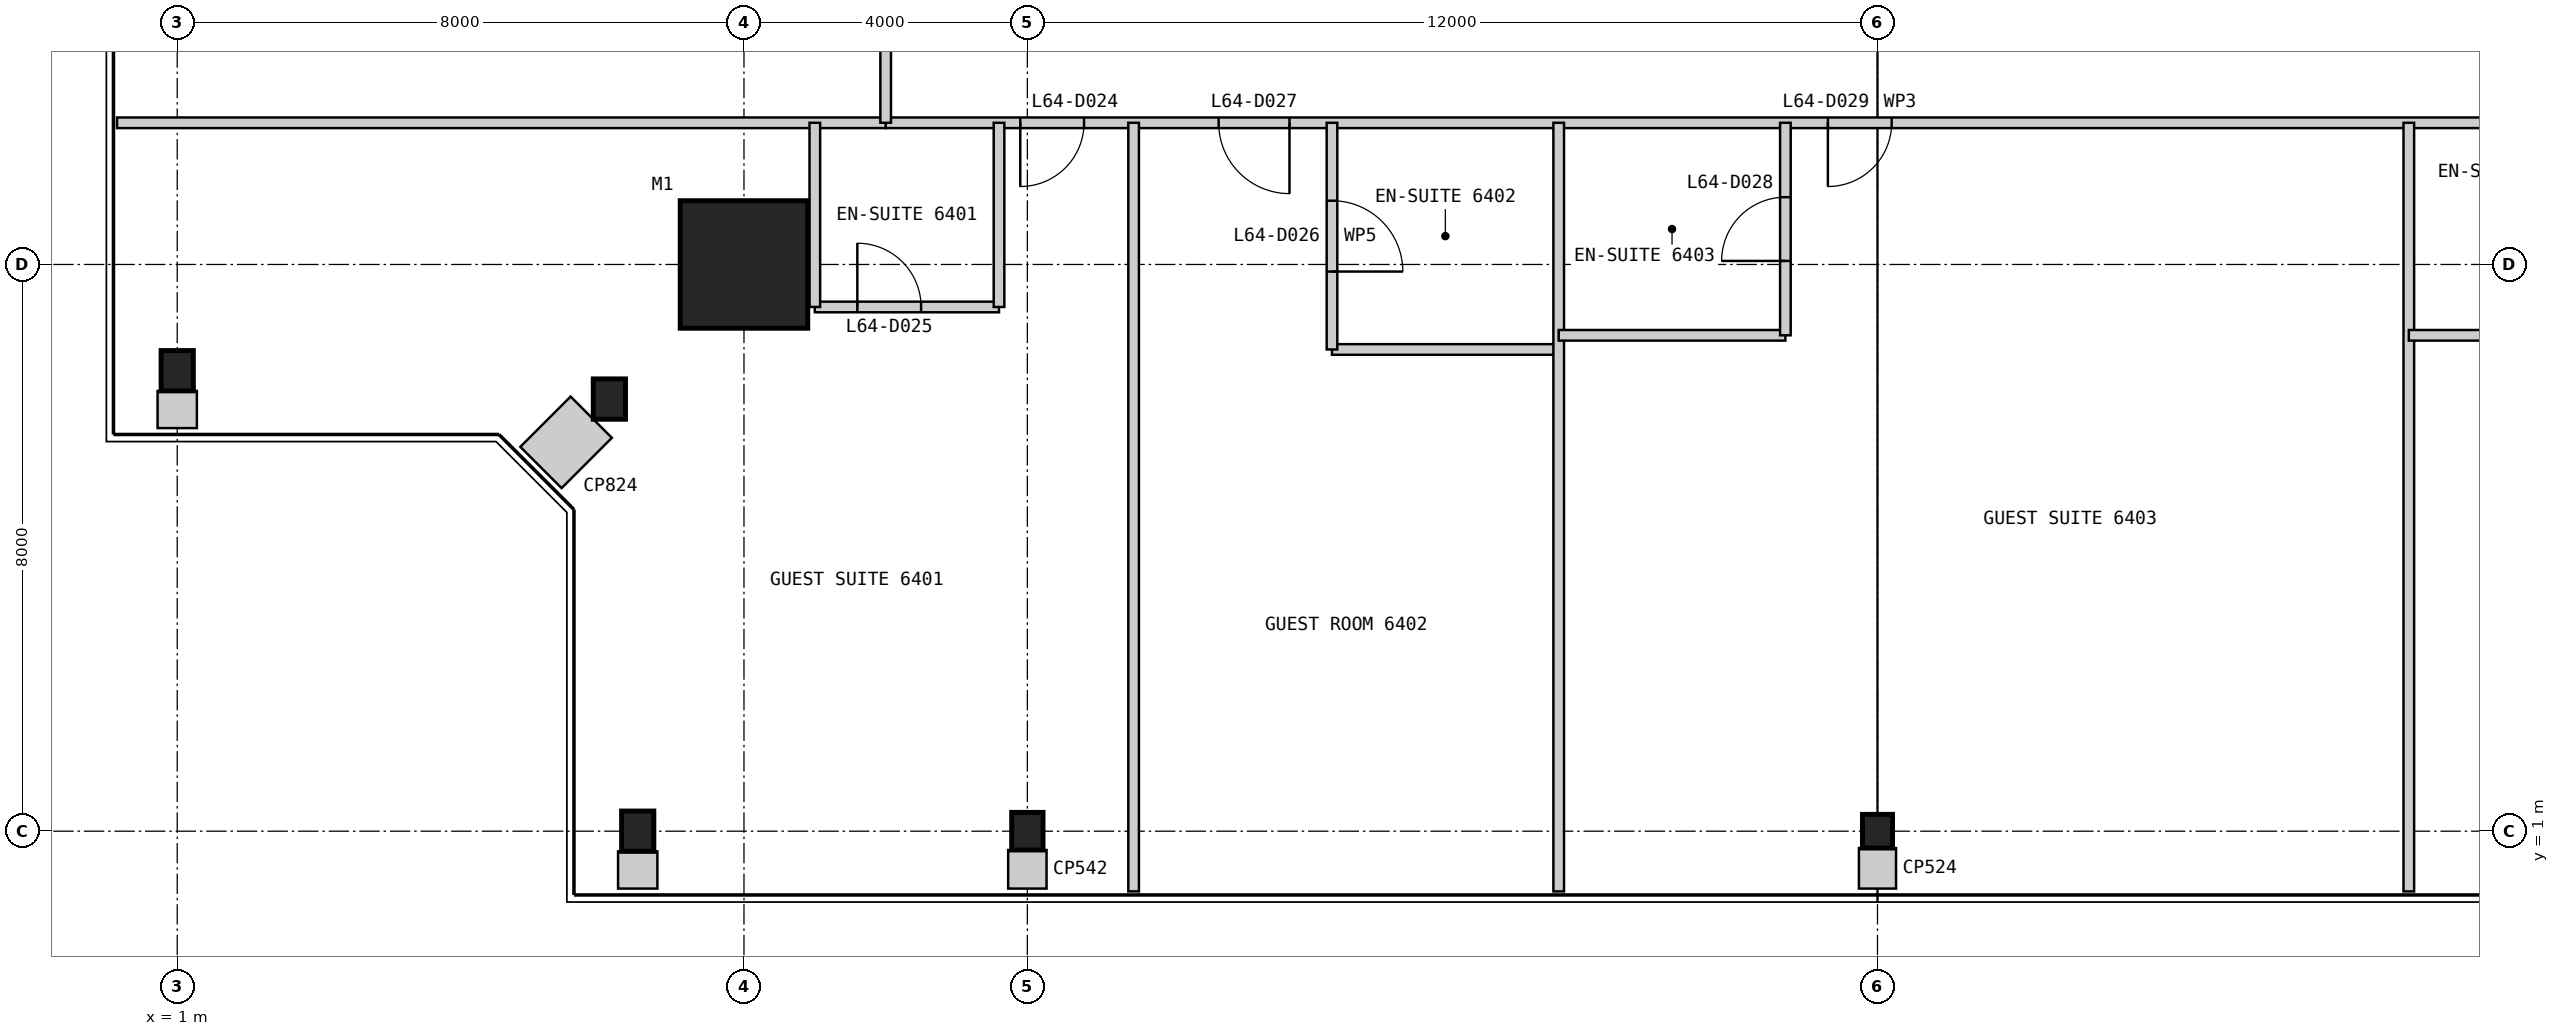
"""IFC4 building model, lengths in metres.
Left out: names, types, materials, properties, quantities, classifications, styles, units other than length and angle.
Written with IfcOpenShell. Run it as: python <this file> out.ifc"""

import sys

from ifc_helpers import new_model, si_unit, direction, frame, frame_2d, origin, origin_2d, place, context, subcontext, project, spatial, rectangle, i_section, extrude, element, fill, save


model = new_model("IFC4")
c1 = context("Model", 3, precision=1e-05, world=origin(), true_north=direction((0.0, 1.0)))
c2 = subcontext(c1, "Body", "Model", "MODEL_VIEW")
j1 = project(units=[si_unit("LENGTHUNIT", "METRE"), si_unit("PLANEANGLEUNIT", "RADIAN")], contexts=[c1])
p1 = place(None, origin())
s1 = spatial("IfcSite", under=j1, at=p1, CompositionType="ELEMENT")
p2 = place(p1, origin())
s2 = spatial("IfcBuilding", under=s1, at=p2, CompositionType="ELEMENT")
p3 = place(p2, frame((0.0, 0.0, 269.6)))
s3 = spatial("IfcBuildingStorey", under=s2, at=p3, CompositionType="ELEMENT", Elevation=269.6)
p4 = place(p3, frame((9.0, 9.0, 0.0), z_axis=(0.0, 0.0, 1.0), x_axis=(1.0, 0.0, 0.0)))
e1 = element("IfcColumn", 1, at=p4, inside=s3, PredefinedType="COLUMN", context=c2, shape_type="SweptSolid", body=[
    extrude(rectangle(XDim=1.8, YDim=1.8, at=origin_2d()), origin(), (0.0, 0.0, 1.0), 3.4),
])
p5 = place(p3, frame((7.5, 1.0, 0.0), z_axis=(0.0, 0.0, 1.0), x_axis=(1.0, 0.0, 0.0)))
e2 = element("IfcColumn", 2, at=p5, inside=s3, PredefinedType="COLUMN", context=c2, shape_type="SweptSolid", body=[
    extrude(i_section(OverallWidth=0.455, OverallDepth=0.569, WebThickness=0.078, FlangeThickness=0.125, at=origin_2d()), origin(), (0.0, 0.0, 1.0), 3.4),
])
p6 = place(p3, frame((13.0, 1.0, 0.0), z_axis=(0.0, 0.0, 1.0), x_axis=(1.0, 0.0, 0.0)))
e3 = element("IfcColumn", 3, at=p6, inside=s3, PredefinedType="COLUMN", context=c2, shape_type="SweptSolid", body=[
    extrude(i_section(OverallWidth=0.442, OverallDepth=0.531, WebThickness=0.066, FlangeThickness=0.106, at=origin_2d()), origin(), (0.0, 0.0, 1.0), 3.4),
])
p7 = place(p3, frame((25.0, 1.0, 0.0), z_axis=(0.0, 0.0, 1.0), x_axis=(1.0, 0.0, 0.0)))
e4 = element("IfcColumn", 4, at=p7, inside=s3, PredefinedType="COLUMN", context=c2, shape_type="SweptSolid", body=[
    extrude(i_section(OverallWidth=0.424, OverallDepth=0.475, WebThickness=0.048, FlangeThickness=0.077, at=origin_2d()), origin(), (0.0, 0.0, 1.0), 3.4),
])
for number, where, z_axis, x_axis in (
    (5, (1.0, 7.5, 0.0), (0.0, 0.0, 1.0), (1.0, 0.0, 0.0)),
    (6, (7.1, 7.1, 0.0), (0.0, 0.0, 1.0), (1.0, 0.0, 0.0)),
):
    element("IfcColumn", number, at=place(p3, frame(where, z_axis=z_axis, x_axis=x_axis)), inside=s3, PredefinedType="COLUMN", context=c2, shape_type="SweptSolid", body=[
        extrude(i_section(OverallWidth=0.455, OverallDepth=0.569, WebThickness=0.078, FlangeThickness=0.125, at=origin_2d()), origin(), (0.0, 0.0, 1.0), 3.4),
    ])
p8 = place(p3, frame((11.0, 11.0, 0.0), z_axis=(0.0, 0.0, 1.0), x_axis=(1.0, 0.0, 0.0)))
e7 = element("IfcWall", 7, at=p8, inside=s3, PredefinedType="PARTITIONING", context=c2, shape_type="SweptSolid", body=[
    extrude(rectangle(XDim=28.0, YDim=0.15, at=frame_2d((14.0, 0.0))), origin(), (0.0, 0.0, 1.0), 2.844),
])
p9 = place(p8, frame((1.9, 0.0, 0.0)))
e8 = element("IfcOpeningElement", 8, at=p9, cuts=e7, PredefinedType="OPENING", context=c2, shape_type="SweptSolid", body=[
    extrude(rectangle(XDim=0.9, YDim=2.1, at=frame_2d((0.45, 1.05))), frame((0.0, 0.085, 0.0), z_axis=(0.0, -1.0, 0.0), x_axis=(1.0, 0.0, 0.0)), (0.0, 0.0, 1.0), 0.17),
])
p10 = place(p8, frame((4.7, 0.0, 0.0)))
e9 = element("IfcOpeningElement", 9, at=p10, cuts=e7, PredefinedType="OPENING", context=c2, shape_type="SweptSolid", body=[
    extrude(rectangle(XDim=1.0, YDim=2.1, at=frame_2d((0.5, 1.05))), frame((0.0, 0.085, 0.0), z_axis=(0.0, -1.0, 0.0), x_axis=(1.0, 0.0, 0.0)), (0.0, 0.0, 1.0), 0.17),
])
p11 = place(p8, frame((13.3, 0.0, 0.0)))
e10 = element("IfcOpeningElement", 10, at=p11, cuts=e7, PredefinedType="OPENING", context=c2, shape_type="SweptSolid", body=[
    extrude(rectangle(XDim=0.9, YDim=2.1, at=frame_2d((0.45, 1.05))), frame((0.0, 0.085, 0.0), z_axis=(0.0, -1.0, 0.0), x_axis=(1.0, 0.0, 0.0)), (0.0, 0.0, 1.0), 0.17),
])
p12 = place(p8, frame((24.9, 0.0, 0.0)))
e11 = element("IfcOpeningElement", 11, at=p12, cuts=e7, PredefinedType="OPENING", context=c2, shape_type="SweptSolid", body=[
    extrude(rectangle(XDim=0.9, YDim=2.1, at=frame_2d((0.45, 1.05))), frame((0.0, 0.085, 0.0), z_axis=(0.0, -1.0, 0.0), x_axis=(1.0, 0.0, 0.0)), (0.0, 0.0, 1.0), 0.17),
])
p13 = place(p3, frame((0.15, 11.0, 0.0), z_axis=(0.0, 0.0, 1.0), x_axis=(1.0, 0.0, 0.0)))
e12 = element("IfcWall", 12, at=p13, inside=s3, PredefinedType="PARTITIONING", context=c2, shape_type="SweptSolid", body=[
    extrude(rectangle(XDim=10.85, YDim=0.15, at=frame_2d((5.425, 0.0))), origin(), (0.0, 0.0, 1.0), 2.844),
])
p14 = place(p3, frame((10.0, 8.4, 0.0), z_axis=(0.0, 0.0, 1.0), x_axis=(1.0, 0.0, 0.0)))
e13 = element("IfcWall", 13, at=p14, inside=s3, PredefinedType="PARTITIONING", context=c2, shape_type="SweptSolid", body=[
    extrude(rectangle(XDim=2.6, YDim=0.15, at=frame_2d((1.3, 0.0))), origin(), (0.0, 0.0, 1.0), 3.25),
])
p15 = place(p14, frame((0.6, 0.0, 0.0)))
e14 = element("IfcOpeningElement", 14, at=p15, cuts=e13, PredefinedType="OPENING", context=c2, shape_type="SweptSolid", body=[
    extrude(rectangle(XDim=0.9, YDim=2.1, at=frame_2d((0.45, 1.05))), frame((0.0, 0.085, 0.0), z_axis=(0.0, -1.0, 0.0), x_axis=(1.0, 0.0, 0.0)), (0.0, 0.0, 1.0), 0.17),
])
for number, where, z_axis, x_axis in (
    (15, (10.0, 8.4, 0.0), (0.0, 0.0, 1.0), (0.0, 1.0, 0.0)),
    (16, (12.6, 8.4, 0.0), (0.0, 0.0, 1.0), (0.0, 1.0, 0.0)),
):
    element("IfcWall", number, at=place(p3, frame(where, z_axis=z_axis, x_axis=x_axis)), inside=s3, PredefinedType="PARTITIONING", context=c2, shape_type="SweptSolid", body=[
        extrude(rectangle(XDim=2.6, YDim=0.15, at=frame_2d((1.3, 0.0))), origin(), (0.0, 0.0, 1.0), 3.25),
    ])
p16 = place(p3, frame((14.5, 0.15, 0.0), z_axis=(0.0, 0.0, 1.0), x_axis=(0.0, 1.0, 0.0)))
e17 = element("IfcWall", 17, at=p16, inside=s3, PredefinedType="PARTITIONING", context=c2, shape_type="SweptSolid", body=[
    extrude(rectangle(XDim=10.85, YDim=0.15, at=frame_2d((5.425, 0.0))), origin(), (0.0, 0.0, 1.0), 3.25),
])
p17 = place(p3, frame((17.3, 7.8, 0.0), z_axis=(0.0, 0.0, 1.0), x_axis=(1.0, 0.0, 0.0)))
e18 = element("IfcWall", 18, at=p17, inside=s3, PredefinedType="PARTITIONING", context=c2, shape_type="SweptSolid", body=[
    extrude(rectangle(XDim=3.2, YDim=0.15, at=frame_2d((1.6, 0.0))), origin(), (0.0, 0.0, 1.0), 3.25),
])
p18 = place(p3, frame((17.3, 7.8, 0.0), z_axis=(0.0, 0.0, 1.0), x_axis=(0.0, 1.0, 0.0)))
e19 = element("IfcWall", 19, at=p18, inside=s3, PredefinedType="PARTITIONING", context=c2, shape_type="SweptSolid", body=[
    extrude(rectangle(XDim=3.2, YDim=0.15, at=frame_2d((1.6, 0.0))), origin(), (0.0, 0.0, 1.0), 3.25),
])
p19 = place(p18, frame((1.1, 0.0, 0.0)))
e20 = element("IfcOpeningElement", 20, at=p19, cuts=e19, PredefinedType="OPENING", context=c2, shape_type="SweptSolid", body=[
    extrude(rectangle(XDim=1.0, YDim=2.1, at=frame_2d((0.5, 1.05))), frame((0.0, 0.085, 0.0), z_axis=(0.0, -1.0, 0.0), x_axis=(1.0, 0.0, 0.0)), (0.0, 0.0, 1.0), 0.17),
])
p20 = place(p3, frame((20.5, 0.15, 0.0), z_axis=(0.0, 0.0, 1.0), x_axis=(0.0, 1.0, 0.0)))
e21 = element("IfcWall", 21, at=p20, inside=s3, PredefinedType="PARTITIONING", context=c2, shape_type="SweptSolid", body=[
    extrude(rectangle(XDim=10.85, YDim=0.15, at=frame_2d((5.425, 0.0))), origin(), (0.0, 0.0, 1.0), 3.25),
])
p21 = place(p3, frame((20.5, 8.0, 0.0), z_axis=(0.0, 0.0, 1.0), x_axis=(1.0, 0.0, 0.0)))
e22 = element("IfcWall", 22, at=p21, inside=s3, PredefinedType="PARTITIONING", context=c2, shape_type="SweptSolid", body=[
    extrude(rectangle(XDim=3.2, YDim=0.15, at=frame_2d((1.6, 0.0))), origin(), (0.0, 0.0, 1.0), 3.25),
])
p22 = place(p3, frame((23.7, 8.0, 0.0), z_axis=(0.0, 0.0, 1.0), x_axis=(0.0, 1.0, 0.0)))
e23 = element("IfcWall", 23, at=p22, inside=s3, PredefinedType="PARTITIONING", context=c2, shape_type="SweptSolid", body=[
    extrude(rectangle(XDim=3.0, YDim=0.15, at=frame_2d((1.5, 0.0))), origin(), (0.0, 0.0, 1.0), 3.25),
])
p23 = place(p22, frame((1.05, 0.0, 0.0)))
e24 = element("IfcOpeningElement", 24, at=p23, cuts=e23, PredefinedType="OPENING", context=c2, shape_type="SweptSolid", body=[
    extrude(rectangle(XDim=0.9, YDim=2.1, at=frame_2d((0.45, 1.05))), frame((0.0, 0.085, 0.0), z_axis=(0.0, -1.0, 0.0), x_axis=(1.0, 0.0, 0.0)), (0.0, 0.0, 1.0), 0.17),
])
p24 = place(p3, frame((32.5, 0.15, 0.0), z_axis=(0.0, 0.0, 1.0), x_axis=(0.0, 1.0, 0.0)))
e25 = element("IfcWall", 25, at=p24, inside=s3, PredefinedType="PARTITIONING", context=c2, shape_type="SweptSolid", body=[
    extrude(rectangle(XDim=10.85, YDim=0.15, at=frame_2d((5.425, 0.0))), origin(), (0.0, 0.0, 1.0), 3.25),
])
p25 = place(p3, frame((32.5, 8.0, 0.0), z_axis=(0.0, 0.0, 1.0), x_axis=(1.0, 0.0, 0.0)))
e26 = element("IfcWall", 26, at=p25, inside=s3, PredefinedType="PARTITIONING", context=c2, shape_type="SweptSolid", body=[
    extrude(rectangle(XDim=2.8, YDim=0.15, at=frame_2d((1.4, 0.0))), origin(), (0.0, 0.0, 1.0), 3.25),
])
p26 = place(p3, frame((11.0, 39.0, 0.0), z_axis=(0.0, 0.0, 1.0), x_axis=(0.0, -1.0, 0.0)))
e27 = element("IfcWall", 27, at=p26, inside=s3, PredefinedType="PARTITIONING", context=c2, shape_type="SweptSolid", body=[
    extrude(rectangle(XDim=28.0, YDim=0.15, at=frame_2d((14.0, 0.0))), origin(), (0.0, 0.0, 1.0), 2.844),
])
p27 = place(p26, frame((2.075, 0.0, 0.0)))
e28 = element("IfcOpeningElement", 28, at=p27, cuts=e27, PredefinedType="OPENING", context=c2, shape_type="SweptSolid", body=[
    extrude(rectangle(XDim=0.9, YDim=2.1, at=frame_2d((0.45, 1.05))), frame((0.0, 0.085, 0.0), z_axis=(0.0, -1.0, 0.0), x_axis=(1.0, 0.0, 0.0)), (0.0, 0.0, 1.0), 0.17),
])
p28 = place(p26, frame((5.2, 0.0, 0.0)))
e29 = element("IfcOpeningElement", 29, at=p28, cuts=e27, PredefinedType="OPENING", context=c2, shape_type="SweptSolid", body=[
    extrude(rectangle(XDim=0.9, YDim=2.1, at=frame_2d((0.45, 1.05))), frame((0.0, 0.085, 0.0), z_axis=(0.0, -1.0, 0.0), x_axis=(1.0, 0.0, 0.0)), (0.0, 0.0, 1.0), 0.17),
])
p29 = place(p26, frame((13.3, 0.0, 0.0)))
e30 = element("IfcOpeningElement", 30, at=p29, cuts=e27, PredefinedType="OPENING", context=c2, shape_type="SweptSolid", body=[
    extrude(rectangle(XDim=0.9, YDim=2.1, at=frame_2d((0.45, 1.05))), frame((0.0, 0.085, 0.0), z_axis=(0.0, -1.0, 0.0), x_axis=(1.0, 0.0, 0.0)), (0.0, 0.0, 1.0), 0.17),
])
p30 = place(p26, frame((24.9, 0.0, 0.0)))
e31 = element("IfcOpeningElement", 31, at=p30, cuts=e27, PredefinedType="OPENING", context=c2, shape_type="SweptSolid", body=[
    extrude(rectangle(XDim=0.9, YDim=2.1, at=frame_2d((0.45, 1.05))), frame((0.0, 0.085, 0.0), z_axis=(0.0, -1.0, 0.0), x_axis=(1.0, 0.0, 0.0)), (0.0, 0.0, 1.0), 0.17),
])
p31 = place(p3, frame((7.5, 0.19, 0.0), z_axis=(0.0, 0.0, 1.0), x_axis=(0.0, 1.0, 0.0)))
e32 = element("IfcWall", 32, at=p31, inside=s3, PredefinedType="PARTITIONING", context=c2, shape_type="SweptSolid", body=[
    extrude(rectangle(XDim=0.526, YDim=0.555, at=frame_2d((0.263, 0.0))), origin(), (0.0, 0.0, 1.0), 3.25),
])
p32 = place(p3, frame((13.0, 0.19, 0.0), z_axis=(0.0, 0.0, 1.0), x_axis=(0.0, 1.0, 0.0)))
e33 = element("IfcWall", 33, at=p32, inside=s3, PredefinedType="PARTITIONING", context=c2, shape_type="SweptSolid", body=[
    extrude(rectangle(XDim=0.545, YDim=0.542, at=frame_2d((0.272, 0.0))), origin(), (0.0, 0.0, 1.0), 3.25),
])
p33 = place(p3, frame((1.0, 6.69, 0.0), z_axis=(0.0, 0.0, 1.0), x_axis=(0.0, 1.0, 0.0)))
e34 = element("IfcWall", 34, at=p33, inside=s3, PredefinedType="PARTITIONING", context=c2, shape_type="SweptSolid", body=[
    extrude(rectangle(XDim=0.526, YDim=0.555, at=frame_2d((0.263, 0.0))), origin(), (0.0, 0.0, 1.0), 3.25),
])
p34 = place(p3, frame((6.134, 6.134, 0.0), z_axis=(0.0, 0.0, 1.0), x_axis=(0.707106781187, 0.707106781187, 0.0)))
e35 = element("IfcWall", 35, at=p34, inside=s3, PredefinedType="PARTITIONING", context=c2, shape_type="SweptSolid", body=[
    extrude(rectangle(XDim=1.004, YDim=0.824, at=frame_2d((0.502, 0.0))), origin(), (0.0, 0.0, 1.0), 3.25),
])
p35 = place(p3, frame((25.0, 0.19, 0.0), z_axis=(0.0, 0.0, 1.0), x_axis=(0.0, 1.0, 0.0)))
e36 = element("IfcWall", 36, at=p35, inside=s3, PredefinedType="PARTITIONING", context=c2, shape_type="SweptSolid", body=[
    extrude(rectangle(XDim=0.573, YDim=0.524, at=frame_2d((0.286, 0.0))), origin(), (0.0, 0.0, 1.0), 3.25),
])
p36 = place(p9, frame((0.9, 0.0, 0.0), z_axis=(0.0, 0.0, 1.0), x_axis=(-1.0, 0.0, 0.0)))
e37 = element("IfcDoor", 37, at=p36, inside=s3, OperationType="SINGLE_SWING_RIGHT", PredefinedType="DOOR", context=c2, shape_type="SweptSolid", body=[
    extrude(rectangle(XDim=0.9, YDim=2.1, at=frame_2d((0.45, 1.05))), frame((0.0, 0.025, 0.0), z_axis=(0.0, -1.0, 0.0), x_axis=(1.0, 0.0, 0.0)), (0.0, 0.0, 1.0), 0.05),
])
fill(e8, e37)
p37 = place(p15, origin())
e38 = element("IfcDoor", 38, at=p37, inside=s3, OperationType="SINGLE_SWING_LEFT", PredefinedType="DOOR", context=c2, shape_type="SweptSolid", body=[
    extrude(rectangle(XDim=0.9, YDim=2.1, at=frame_2d((0.45, 1.05))), frame((0.0, 0.025, 0.0), z_axis=(0.0, -1.0, 0.0), x_axis=(1.0, 0.0, 0.0)), (0.0, 0.0, 1.0), 0.05),
])
fill(e14, e38)
p38 = place(p19, frame((1.0, 0.0, 0.0), z_axis=(0.0, 0.0, 1.0), x_axis=(-1.0, 0.0, 0.0)))
e39 = element("IfcDoor", 39, at=p38, inside=s3, OperationType="SINGLE_SWING_RIGHT", PredefinedType="DOOR", context=c2, shape_type="SweptSolid", body=[
    extrude(rectangle(XDim=1.0, YDim=2.1, at=frame_2d((0.5, 1.05))), frame((0.0, 0.025, 0.0), z_axis=(0.0, -1.0, 0.0), x_axis=(1.0, 0.0, 0.0)), (0.0, 0.0, 1.0), 0.05),
])
fill(e20, e39)
p39 = place(p10, frame((1.0, 0.0, 0.0), z_axis=(0.0, 0.0, 1.0), x_axis=(-1.0, 0.0, 0.0)))
e40 = element("IfcDoor", 40, at=p39, inside=s3, OperationType="SINGLE_SWING_LEFT", PredefinedType="DOOR", context=c2, shape_type="SweptSolid", body=[
    extrude(rectangle(XDim=1.0, YDim=2.1, at=frame_2d((0.5, 1.05))), frame((0.0, 0.025, 0.0), z_axis=(0.0, -1.0, 0.0), x_axis=(1.0, 0.0, 0.0)), (0.0, 0.0, 1.0), 0.05),
])
fill(e9, e40)
p40 = place(p23, origin())
e41 = element("IfcDoor", 41, at=p40, inside=s3, OperationType="SINGLE_SWING_LEFT", PredefinedType="DOOR", context=c2, shape_type="SweptSolid", body=[
    extrude(rectangle(XDim=0.9, YDim=2.1, at=frame_2d((0.45, 1.05))), frame((0.0, 0.025, 0.0), z_axis=(0.0, -1.0, 0.0), x_axis=(1.0, 0.0, 0.0)), (0.0, 0.0, 1.0), 0.05),
])
fill(e24, e41)
p41 = place(p11, frame((0.9, 0.0, 0.0), z_axis=(0.0, 0.0, 1.0), x_axis=(-1.0, 0.0, 0.0)))
e42 = element("IfcDoor", 42, at=p41, inside=s3, OperationType="SINGLE_SWING_RIGHT", PredefinedType="DOOR", context=c2, shape_type="SweptSolid", body=[
    extrude(rectangle(XDim=0.9, YDim=2.1, at=frame_2d((0.45, 1.05))), frame((0.0, 0.025, 0.0), z_axis=(0.0, -1.0, 0.0), x_axis=(1.0, 0.0, 0.0)), (0.0, 0.0, 1.0), 0.05),
])
fill(e10, e42)
save(model, sys.argv[1])
